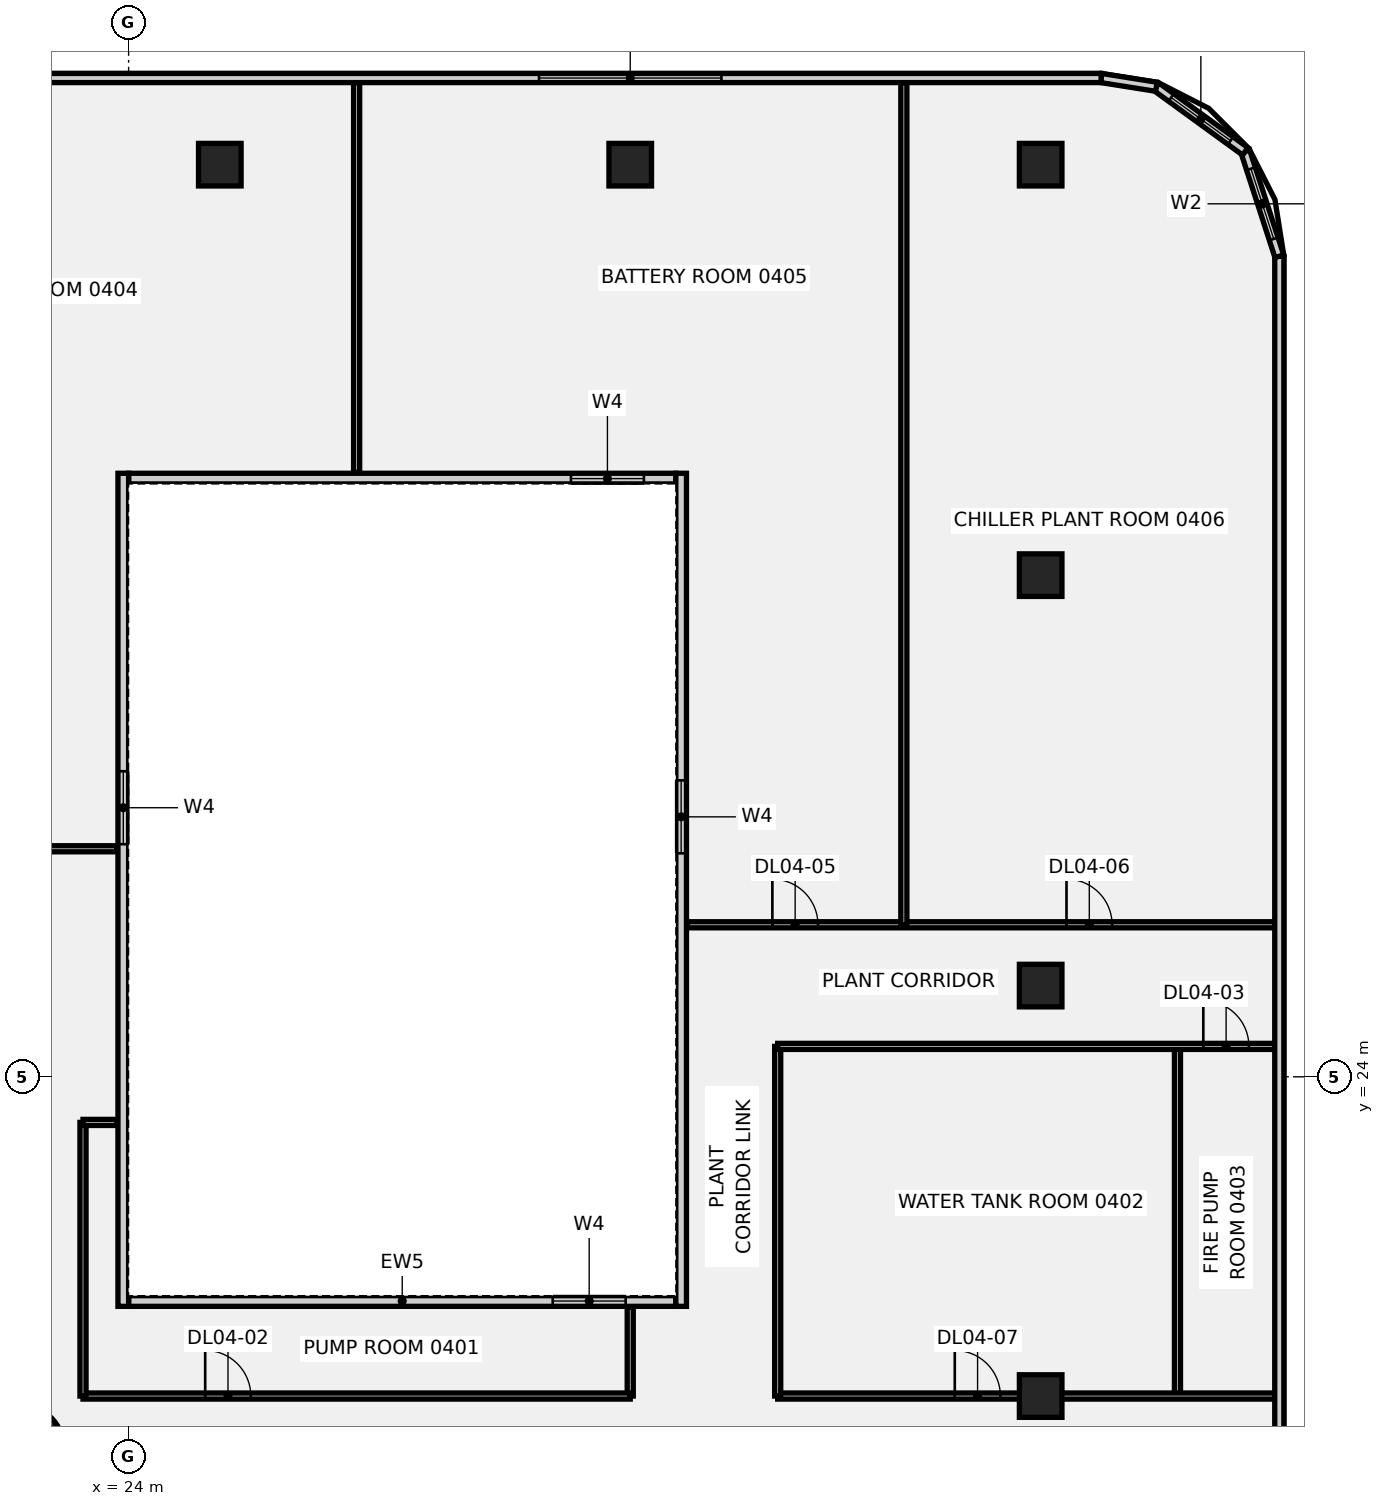
"""IFC4 building model, lengths in metres.
Left out: names, types, materials, properties, quantities, classifications, styles, units other than length and angle.
Written with IfcOpenShell. Run it as: python <this file> out.ifc"""

import sys

from ifc_helpers import new_model, si_unit, direction, frame, frame_2d, origin, origin_2d, place, context, subcontext, project, spatial, rectangle, circle, extrude, element, fill, save


model = new_model("IFC4")
c1 = context("Model", 3, precision=1e-05, world=origin(), true_north=direction((0.0, 1.0)))
c2 = subcontext(c1, "Body", "Model", "MODEL_VIEW")
j1 = project(units=[si_unit("LENGTHUNIT", "METRE"), si_unit("PLANEANGLEUNIT", "RADIAN")], contexts=[c1])
p1 = place(None, origin())
s1 = spatial("IfcSite", under=j1, at=p1, CompositionType="ELEMENT")
p2 = place(p1, origin())
s2 = spatial("IfcBuilding", under=s1, at=p2, CompositionType="ELEMENT")
p3 = place(p2, frame((0.0, 0.0, 25.0)))
s3 = spatial("IfcBuildingStorey", under=s2, at=p3, CompositionType="ELEMENT", Elevation=25.0)
p4 = place(p3, frame((20.543, 11.86, -0.45), z_axis=(0.0, 0.0, 1.0), x_axis=(1.0, 0.0, 0.0)))
e1 = element("IfcColumn", 1, at=p4, inside=s3, PredefinedType="COLUMN", context=c2, shape_type="SweptSolid", body=[
    extrude(circle(Radius=1.3, at=origin_2d()), origin(), (0.0, 0.0, 1.0), 4.35),
])
for number, where, z_axis, x_axis in (
    (2, (27.0, 54.0, -0.45), (0.0, 0.0, 1.0), (1.0, 0.0, 0.0)),
    (3, (40.5, 54.0, -0.45), (0.0, 0.0, 1.0), (1.0, 0.0, 0.0)),
    (4, (54.0, 13.5, -0.45), (0.0, 0.0, 1.0), (1.0, 0.0, 0.0)),
    (5, (54.0, 27.0, -0.45), (0.0, 0.0, 1.0), (1.0, 0.0, 0.0)),
    (6, (54.0, 40.5, -0.45), (0.0, 0.0, 1.0), (1.0, 0.0, 0.0)),
    (7, (54.0, 54.0, -0.45), (0.0, 0.0, 1.0), (1.0, 0.0, 0.0)),
):
    element("IfcColumn", number, at=place(p3, frame(where, z_axis=z_axis, x_axis=x_axis)), inside=s3, PredefinedType="COLUMN", context=c2, shape_type="SweptSolid", body=[
        extrude(rectangle(XDim=1.4, YDim=1.4, at=origin_2d()), origin(), (0.0, 0.0, 1.0), 4.35),
    ])
p5 = place(p3, frame((13.5, 31.5, 0.0), z_axis=(0.0, 0.0, 1.0), x_axis=(1.0, 0.0, 0.0)))
e8 = element("IfcWall", 8, at=p5, inside=s3, PredefinedType="PARTITIONING", context=c2, shape_type="SweptSolid", body=[
    extrude(rectangle(XDim=10.12, YDim=0.2, at=frame_2d((5.06, 0.0))), origin(), (0.0, 0.0, 1.0), 3.9),
])
p6 = place(p3, frame((40.5, 13.5, 0.0), z_axis=(0.0, 0.0, 1.0), x_axis=(0.0, 1.0, 0.0)))
e9 = element("IfcWall", 9, at=p6, inside=s3, PredefinedType="PARTITIONING", context=c2, shape_type="SweptSolid", body=[
    extrude(rectangle(XDim=2.92, YDim=0.2, at=frame_2d((1.46, 0.0))), origin(), (0.0, 0.0, 1.0), 3.9),
])
p7 = place(p3, frame((22.5, 13.5, 0.0), z_axis=(0.0, 0.0, 1.0), x_axis=(1.0, 0.0, 0.0)))
e10 = element("IfcWall", 10, at=p7, inside=s3, PredefinedType="PARTITIONING", context=c2, shape_type="SweptSolid", body=[
    extrude(rectangle(XDim=18.0, YDim=0.2, at=frame_2d((9.0, 0.0))), origin(), (0.0, 0.0, 1.0), 3.9),
])
p8 = place(p7, frame((4.019, 0.0, 0.0)))
e11 = element("IfcOpeningElement", 11, at=p8, cuts=e10, PredefinedType="OPENING", context=c2, shape_type="SweptSolid", body=[
    extrude(rectangle(XDim=1.5, YDim=2.1, at=frame_2d((0.75, 1.05))), frame((0.0, 0.11, 0.0), z_axis=(0.0, -1.0, 0.0), x_axis=(1.0, 0.0, 0.0)), (0.0, 0.0, 1.0), 0.22),
])
p9 = place(p3, frame((22.5, 13.5, 0.0), z_axis=(0.0, 0.0, 1.0), x_axis=(0.0, 1.0, 0.0)))
e12 = element("IfcWall", 12, at=p9, inside=s3, PredefinedType="PARTITIONING", context=c2, shape_type="SweptSolid", body=[
    extrude(rectangle(XDim=9.0, YDim=0.2, at=frame_2d((4.5, 0.0))), origin(), (0.0, 0.0, 1.0), 3.9),
])
p10 = place(p3, frame((22.5, 22.5, 0.0), z_axis=(0.0, 0.0, 1.0), x_axis=(1.0, 0.0, 0.0)))
e13 = element("IfcWall", 13, at=p10, inside=s3, PredefinedType="PARTITIONING", context=c2, shape_type="SweptSolid", body=[
    extrude(rectangle(XDim=1.12, YDim=0.2, at=frame_2d((0.56, 0.0))), origin(), (0.0, 0.0, 1.0), 3.9),
])
p11 = place(p3, frame((31.5, 43.88, 0.0), z_axis=(0.0, 0.0, 1.0), x_axis=(0.0, 1.0, 0.0)))
e14 = element("IfcWall", 14, at=p11, inside=s3, PredefinedType="PARTITIONING", context=c2, shape_type="SweptSolid", body=[
    extrude(rectangle(XDim=12.819, YDim=0.2, at=frame_2d((6.41, 0.0))), origin(), (0.0, 0.0, 1.0), 3.9),
])
p12 = place(p3, frame((42.38, 29.0, 0.0), z_axis=(0.0, 0.0, 1.0), x_axis=(1.0, 0.0, 0.0)))
e15 = element("IfcWall", 15, at=p12, inside=s3, PredefinedType="PARTITIONING", context=c2, shape_type="SweptSolid", body=[
    extrude(rectangle(XDim=19.319, YDim=0.2, at=frame_2d((9.66, 0.0))), origin(), (0.0, 0.0, 1.0), 3.9),
])
p13 = place(p12, frame((2.795, 0.0, 0.0)))
e16 = element("IfcOpeningElement", 16, at=p13, cuts=e15, PredefinedType="OPENING", context=c2, shape_type="SweptSolid", body=[
    extrude(rectangle(XDim=1.5, YDim=2.1, at=frame_2d((0.75, 1.05))), frame((0.0, 0.11, 0.0), z_axis=(0.0, -1.0, 0.0), x_axis=(1.0, 0.0, 0.0)), (0.0, 0.0, 1.0), 0.22),
])
p14 = place(p12, frame((12.47, 0.0, 0.0)))
e17 = element("IfcOpeningElement", 17, at=p14, cuts=e15, PredefinedType="OPENING", context=c2, shape_type="SweptSolid", body=[
    extrude(rectangle(XDim=1.5, YDim=2.1, at=frame_2d((0.75, 1.05))), frame((0.0, 0.11, 0.0), z_axis=(0.0, -1.0, 0.0), x_axis=(1.0, 0.0, 0.0)), (0.0, 0.0, 1.0), 0.22),
])
p15 = place(p3, frame((49.5, 29.0, 0.0), z_axis=(0.0, 0.0, 1.0), x_axis=(0.0, 1.0, 0.0)))
e18 = element("IfcWall", 18, at=p15, inside=s3, PredefinedType="PARTITIONING", context=c2, shape_type="SweptSolid", body=[
    extrude(rectangle(XDim=27.699, YDim=0.2, at=frame_2d((13.85, 0.0))), origin(), (0.0, 0.0, 1.0), 3.9),
])
p16 = place(p3, frame((58.5, 13.5, 0.0), z_axis=(0.0, 0.0, 1.0), x_axis=(0.0, 1.0, 0.0)))
e19 = element("IfcWall", 19, at=p16, inside=s3, PredefinedType="PARTITIONING", context=c2, shape_type="SweptSolid", body=[
    extrude(rectangle(XDim=11.5, YDim=0.2, at=frame_2d((5.75, 0.0))), origin(), (0.0, 0.0, 1.0), 3.9),
])
p17 = place(p3, frame((45.35, 13.5, 0.0), z_axis=(0.0, 0.0, 1.0), x_axis=(1.0, 0.0, 0.0)))
e20 = element("IfcWall", 20, at=p17, inside=s3, PredefinedType="PARTITIONING", context=c2, shape_type="SweptSolid", body=[
    extrude(rectangle(XDim=16.349, YDim=0.2, at=frame_2d((8.174, 0.0))), origin(), (0.0, 0.0, 1.0), 3.9),
])
p18 = place(p17, frame((5.825, 0.0, 0.0)))
e21 = element("IfcOpeningElement", 21, at=p18, cuts=e20, PredefinedType="OPENING", context=c2, shape_type="SweptSolid", body=[
    extrude(rectangle(XDim=1.5, YDim=2.1, at=frame_2d((0.75, 1.05))), frame((0.0, 0.11, 0.0), z_axis=(0.0, -1.0, 0.0), x_axis=(1.0, 0.0, 0.0)), (0.0, 0.0, 1.0), 0.22),
])
p19 = place(p3, frame((45.35, 13.5, 0.0), z_axis=(0.0, 0.0, 1.0), x_axis=(0.0, 1.0, 0.0)))
e22 = element("IfcWall", 22, at=p19, inside=s3, PredefinedType="PARTITIONING", context=c2, shape_type="SweptSolid", body=[
    extrude(rectangle(XDim=11.5, YDim=0.2, at=frame_2d((5.75, 0.0))), origin(), (0.0, 0.0, 1.0), 3.9),
])
p20 = place(p3, frame((45.35, 25.0, 0.0), z_axis=(0.0, 0.0, 1.0), x_axis=(1.0, 0.0, 0.0)))
e23 = element("IfcWall", 23, at=p20, inside=s3, PredefinedType="PARTITIONING", context=c2, shape_type="SweptSolid", body=[
    extrude(rectangle(XDim=16.349, YDim=0.2, at=frame_2d((8.174, 0.0))), origin(), (0.0, 0.0, 1.0), 3.9),
])
p21 = place(p20, frame((14.0, 0.0, 0.0)))
e24 = element("IfcOpeningElement", 24, at=p21, cuts=e23, PredefinedType="OPENING", context=c2, shape_type="SweptSolid", body=[
    extrude(rectangle(XDim=1.5, YDim=2.1, at=frame_2d((0.75, 1.05))), frame((0.0, 0.11, 0.0), z_axis=(0.0, -1.0, 0.0), x_axis=(1.0, 0.0, 0.0)), (0.0, 0.0, 1.0), 0.22),
])
p22 = place(p3, frame((61.85, -50.988, 0.0), z_axis=(0.0, 0.0, 1.0), x_axis=(0.0, 1.0, 0.0)))
e25 = element("IfcWall", 25, at=p22, inside=s3, PredefinedType="SOLIDWALL", context=c2, shape_type="SweptSolid", body=[
    extrude(rectangle(XDim=101.977, YDim=0.3, at=frame_2d((50.988, 0.0))), origin(), (0.0, 0.0, 1.0), 3.9),
])
p23 = place(p22, frame((47.988, 0.0, 1.4)))
e26 = element("IfcOpeningElement", 26, at=p23, cuts=e25, PredefinedType="OPENING", context=c2, shape_type="SweptSolid", body=[
    extrude(rectangle(XDim=6.0, YDim=2.2, at=frame_2d((3.0, 1.1))), frame((0.0, 0.16, 0.0), z_axis=(0.0, -1.0, 0.0), x_axis=(1.0, 0.0, 0.0)), (0.0, 0.0, 1.0), 0.32),
])
p24 = place(p3, frame((61.85, 50.988, 0.0), z_axis=(0.0, 0.0, 1.0), x_axis=(-0.308562324189, 0.951204127457, 0.0)))
e27 = element("IfcWall", 27, at=p24, inside=s3, PredefinedType="SOLIDWALL", context=c2, shape_type="SweptSolid", body=[
    extrude(rectangle(XDim=3.626, YDim=0.3, at=frame_2d((1.813, 0.0))), origin(), (0.0, 0.0, 1.0), 3.9),
])
p25 = place(p24, frame((0.6, 0.0, 1.4)))
e28 = element("IfcOpeningElement", 28, at=p25, cuts=e27, PredefinedType="OPENING", context=c2, shape_type="SweptSolid", body=[
    extrude(rectangle(XDim=2.426, YDim=2.2, at=frame_2d((1.213, 1.1))), frame((0.0, 0.16, 0.0), z_axis=(0.0, -1.0, 0.0), x_axis=(1.0, 0.0, 0.0)), (0.0, 0.0, 1.0), 0.32),
])
p26 = place(p3, frame((60.731, 54.438, 0.0), z_axis=(0.0, 0.0, 1.0), x_axis=(-0.80901056566, 0.587794100557, 0.0)))
e29 = element("IfcWall", 29, at=p26, inside=s3, PredefinedType="SOLIDWALL", context=c2, shape_type="SweptSolid", body=[
    extrude(rectangle(XDim=3.615, YDim=0.3, at=frame_2d((1.807, 0.0))), origin(), (0.0, 0.0, 1.0), 3.9),
])
p27 = place(p26, frame((0.6, 0.0, 1.4)))
e30 = element("IfcOpeningElement", 30, at=p27, cuts=e29, PredefinedType="OPENING", context=c2, shape_type="SweptSolid", body=[
    extrude(rectangle(XDim=2.414, YDim=2.2, at=frame_2d((1.207, 1.1))), frame((0.0, 0.16, 0.0), z_axis=(0.0, -1.0, 0.0), x_axis=(1.0, 0.0, 0.0)), (0.0, 0.0, 1.0), 0.32),
])
p28 = place(p3, frame((57.807, 56.562, 0.0), z_axis=(0.0, 0.0, 1.0), x_axis=(-0.987687604806, 0.15643911056, 0.0)))
e31 = element("IfcWall", 31, at=p28, inside=s3, PredefinedType="SOLIDWALL", context=c2, shape_type="SweptSolid", body=[
    extrude(rectangle(XDim=1.842, YDim=0.3, at=frame_2d((0.921, 0.0))), origin(), (0.0, 0.0, 1.0), 3.9),
])
p29 = place(p3, frame((55.988, 56.85, 0.0), z_axis=(0.0, 0.0, 1.0), x_axis=(-1.0, 0.0, 0.0)))
e32 = element("IfcWall", 32, at=p29, inside=s3, PredefinedType="SOLIDWALL", context=c2, shape_type="SweptSolid", body=[
    extrude(rectangle(XDim=111.977, YDim=0.3, at=frame_2d((55.988, 0.0))), origin(), (0.0, 0.0, 1.0), 3.9),
])
p30 = place(p29, frame((12.488, 0.0, 1.4)))
e33 = element("IfcOpeningElement", 33, at=p30, cuts=e32, PredefinedType="OPENING", context=c2, shape_type="SweptSolid", body=[
    extrude(rectangle(XDim=6.0, YDim=2.2, at=frame_2d((3.0, 1.1))), frame((0.0, 0.16, 0.0), z_axis=(0.0, -1.0, 0.0), x_axis=(1.0, 0.0, 0.0)), (0.0, 0.0, 1.0), 0.32),
])
p31 = place(p3, frame((24.0, 16.625, 0.0), z_axis=(0.0, 0.0, 1.0), x_axis=(1.0, 0.0, 0.0)))
e34 = element("IfcWall", 34, at=p31, inside=s3, PredefinedType="SOLIDWALL", context=c2, shape_type="SweptSolid", body=[
    extrude(rectangle(XDim=18.0, YDim=0.35, at=frame_2d((9.0, 0.0))), origin(), (0.0, 0.0, 1.0), 3.9),
])
p32 = place(p31, frame((13.95, 0.0, 1.0)))
e35 = element("IfcOpeningElement", 35, at=p32, cuts=e34, PredefinedType="OPENING", context=c2, shape_type="SweptSolid", body=[
    extrude(rectangle(XDim=2.4, YDim=1.8, at=frame_2d((1.2, 0.9))), frame((0.0, 0.185, 0.0), z_axis=(0.0, -1.0, 0.0), x_axis=(1.0, 0.0, 0.0)), (0.0, 0.0, 1.0), 0.37),
])
p33 = place(p3, frame((24.0, 43.675, 0.0), z_axis=(0.0, 0.0, 1.0), x_axis=(1.0, 0.0, 0.0)))
e36 = element("IfcWall", 36, at=p33, inside=s3, PredefinedType="SOLIDWALL", context=c2, shape_type="SweptSolid", body=[
    extrude(rectangle(XDim=18.0, YDim=0.35, at=frame_2d((9.0, 0.0))), origin(), (0.0, 0.0, 1.0), 3.9),
])
p34 = place(p33, frame((14.55, 0.0, 1.0)))
e37 = element("IfcOpeningElement", 37, at=p34, cuts=e36, PredefinedType="OPENING", context=c2, shape_type="SweptSolid", body=[
    extrude(rectangle(XDim=2.4, YDim=1.8, at=frame_2d((1.2, 0.9))), frame((0.0, 0.185, 0.0), z_axis=(0.0, -1.0, 0.0), x_axis=(1.0, 0.0, 0.0)), (0.0, 0.0, 1.0), 0.37),
])
p35 = place(p3, frame((23.825, 16.45, 0.0), z_axis=(0.0, 0.0, 1.0), x_axis=(0.0, 1.0, 0.0)))
e38 = element("IfcWall", 38, at=p35, inside=s3, PredefinedType="SOLIDWALL", context=c2, shape_type="SweptSolid", body=[
    extrude(rectangle(XDim=27.4, YDim=0.35, at=frame_2d((13.7, 0.0))), origin(), (0.0, 0.0, 1.0), 3.9),
])
p36 = place(p35, frame((15.2, 0.0, 1.0)))
e39 = element("IfcOpeningElement", 39, at=p36, cuts=e38, PredefinedType="OPENING", context=c2, shape_type="SweptSolid", body=[
    extrude(rectangle(XDim=2.4, YDim=1.8, at=frame_2d((1.2, 0.9))), frame((0.0, 0.185, 0.0), z_axis=(0.0, -1.0, 0.0), x_axis=(1.0, 0.0, 0.0)), (0.0, 0.0, 1.0), 0.37),
])
p37 = place(p3, frame((42.175, 16.45, 0.0), z_axis=(0.0, 0.0, 1.0), x_axis=(0.0, 1.0, 0.0)))
e40 = element("IfcWall", 40, at=p37, inside=s3, PredefinedType="SOLIDWALL", context=c2, shape_type="SweptSolid", body=[
    extrude(rectangle(XDim=27.4, YDim=0.35, at=frame_2d((13.7, 0.0))), origin(), (0.0, 0.0, 1.0), 3.9),
])
p38 = place(p37, frame((14.9, 0.0, 1.0)))
e41 = element("IfcOpeningElement", 41, at=p38, cuts=e40, PredefinedType="OPENING", context=c2, shape_type="SweptSolid", body=[
    extrude(rectangle(XDim=2.4, YDim=1.8, at=frame_2d((1.2, 0.9))), frame((0.0, 0.185, 0.0), z_axis=(0.0, -1.0, 0.0), x_axis=(1.0, 0.0, 0.0)), (0.0, 0.0, 1.0), 0.37),
])
p39 = place(p8, origin())
e42 = element("IfcDoor", 42, at=p39, inside=s3, OperationType="SINGLE_SWING_RIGHT", PredefinedType="DOOR", context=c2, shape_type="SweptSolid", body=[
    extrude(rectangle(XDim=1.5, YDim=2.1, at=frame_2d((0.75, 1.05))), frame((0.0, 0.025, 0.0), z_axis=(0.0, -1.0, 0.0), x_axis=(1.0, 0.0, 0.0)), (0.0, 0.0, 1.0), 0.05),
])
fill(e11, e42)
p40 = place(p21, origin())
e43 = element("IfcDoor", 43, at=p40, inside=s3, OperationType="SINGLE_SWING_LEFT", PredefinedType="DOOR", context=c2, shape_type="SweptSolid", body=[
    extrude(rectangle(XDim=1.5, YDim=2.1, at=frame_2d((0.75, 1.05))), frame((0.0, 0.025, 0.0), z_axis=(0.0, -1.0, 0.0), x_axis=(1.0, 0.0, 0.0)), (0.0, 0.0, 1.0), 0.05),
])
fill(e24, e43)
p41 = place(p13, origin())
e44 = element("IfcDoor", 44, at=p41, inside=s3, OperationType="SINGLE_SWING_LEFT", PredefinedType="DOOR", context=c2, shape_type="SweptSolid", body=[
    extrude(rectangle(XDim=1.5, YDim=2.1, at=frame_2d((0.75, 1.05))), frame((0.0, 0.025, 0.0), z_axis=(0.0, -1.0, 0.0), x_axis=(1.0, 0.0, 0.0)), (0.0, 0.0, 1.0), 0.05),
])
fill(e16, e44)
p42 = place(p14, origin())
e45 = element("IfcDoor", 45, at=p42, inside=s3, OperationType="SINGLE_SWING_RIGHT", PredefinedType="DOOR", context=c2, shape_type="SweptSolid", body=[
    extrude(rectangle(XDim=1.5, YDim=2.1, at=frame_2d((0.75, 1.05))), frame((0.0, 0.025, 0.0), z_axis=(0.0, -1.0, 0.0), x_axis=(1.0, 0.0, 0.0)), (0.0, 0.0, 1.0), 0.05),
])
fill(e17, e45)
p43 = place(p18, origin())
e46 = element("IfcDoor", 46, at=p43, inside=s3, OperationType="SINGLE_SWING_LEFT", PredefinedType="DOOR", context=c2, shape_type="SweptSolid", body=[
    extrude(rectangle(XDim=1.5, YDim=2.1, at=frame_2d((0.75, 1.05))), frame((0.0, 0.025, 0.0), z_axis=(0.0, -1.0, 0.0), x_axis=(1.0, 0.0, 0.0)), (0.0, 0.0, 1.0), 0.05),
])
fill(e21, e46)
p44 = place(p25, origin())
e47 = element("IfcWindow", 47, at=p44, inside=s3, PartitioningType="SINGLE_PANEL", PredefinedType="WINDOW", context=c2, shape_type="SweptSolid", body=[
    extrude(rectangle(XDim=2.426, YDim=2.2, at=frame_2d((1.213, 1.1))), frame((0.0, 0.03, 0.0), z_axis=(0.0, -1.0, 0.0), x_axis=(1.0, 0.0, 0.0)), (0.0, 0.0, 1.0), 0.06),
])
fill(e28, e47)
p45 = place(p27, origin())
e48 = element("IfcWindow", 48, at=p45, inside=s3, PartitioningType="SINGLE_PANEL", PredefinedType="WINDOW", context=c2, shape_type="SweptSolid", body=[
    extrude(rectangle(XDim=2.414, YDim=2.2, at=frame_2d((1.207, 1.1))), frame((0.0, 0.03, 0.0), z_axis=(0.0, -1.0, 0.0), x_axis=(1.0, 0.0, 0.0)), (0.0, 0.0, 1.0), 0.06),
])
fill(e30, e48)
p46 = place(p30, origin())
e49 = element("IfcWindow", 49, at=p46, inside=s3, PartitioningType="SINGLE_PANEL", PredefinedType="WINDOW", context=c2, shape_type="SweptSolid", body=[
    extrude(rectangle(XDim=6.0, YDim=2.2, at=frame_2d((3.0, 1.1))), frame((0.0, 0.03, 0.0), z_axis=(0.0, -1.0, 0.0), x_axis=(1.0, 0.0, 0.0)), (0.0, 0.0, 1.0), 0.06),
])
fill(e33, e49)
p47 = place(p32, origin())
e50 = element("IfcWindow", 50, at=p47, inside=s3, PartitioningType="SINGLE_PANEL", PredefinedType="WINDOW", context=c2, shape_type="SweptSolid", body=[
    extrude(rectangle(XDim=2.4, YDim=1.8, at=frame_2d((1.2, 0.9))), frame((0.0, 0.03, 0.0), z_axis=(0.0, -1.0, 0.0), x_axis=(1.0, 0.0, 0.0)), (0.0, 0.0, 1.0), 0.06),
])
fill(e35, e50)
p48 = place(p34, origin())
e51 = element("IfcWindow", 51, at=p48, inside=s3, PartitioningType="SINGLE_PANEL", PredefinedType="WINDOW", context=c2, shape_type="SweptSolid", body=[
    extrude(rectangle(XDim=2.4, YDim=1.8, at=frame_2d((1.2, 0.9))), frame((0.0, 0.03, 0.0), z_axis=(0.0, -1.0, 0.0), x_axis=(1.0, 0.0, 0.0)), (0.0, 0.0, 1.0), 0.06),
])
fill(e37, e51)
p49 = place(p36, origin())
e52 = element("IfcWindow", 52, at=p49, inside=s3, PartitioningType="SINGLE_PANEL", PredefinedType="WINDOW", context=c2, shape_type="SweptSolid", body=[
    extrude(rectangle(XDim=2.4, YDim=1.8, at=frame_2d((1.2, 0.9))), frame((0.0, 0.03, 0.0), z_axis=(0.0, -1.0, 0.0), x_axis=(1.0, 0.0, 0.0)), (0.0, 0.0, 1.0), 0.06),
])
fill(e39, e52)
p50 = place(p38, origin())
e53 = element("IfcWindow", 53, at=p50, inside=s3, PartitioningType="SINGLE_PANEL", PredefinedType="WINDOW", context=c2, shape_type="SweptSolid", body=[
    extrude(rectangle(XDim=2.4, YDim=1.8, at=frame_2d((1.2, 0.9))), frame((0.0, 0.03, 0.0), z_axis=(0.0, -1.0, 0.0), x_axis=(1.0, 0.0, 0.0)), (0.0, 0.0, 1.0), 0.06),
])
fill(e41, e53)
save(model, sys.argv[1])
